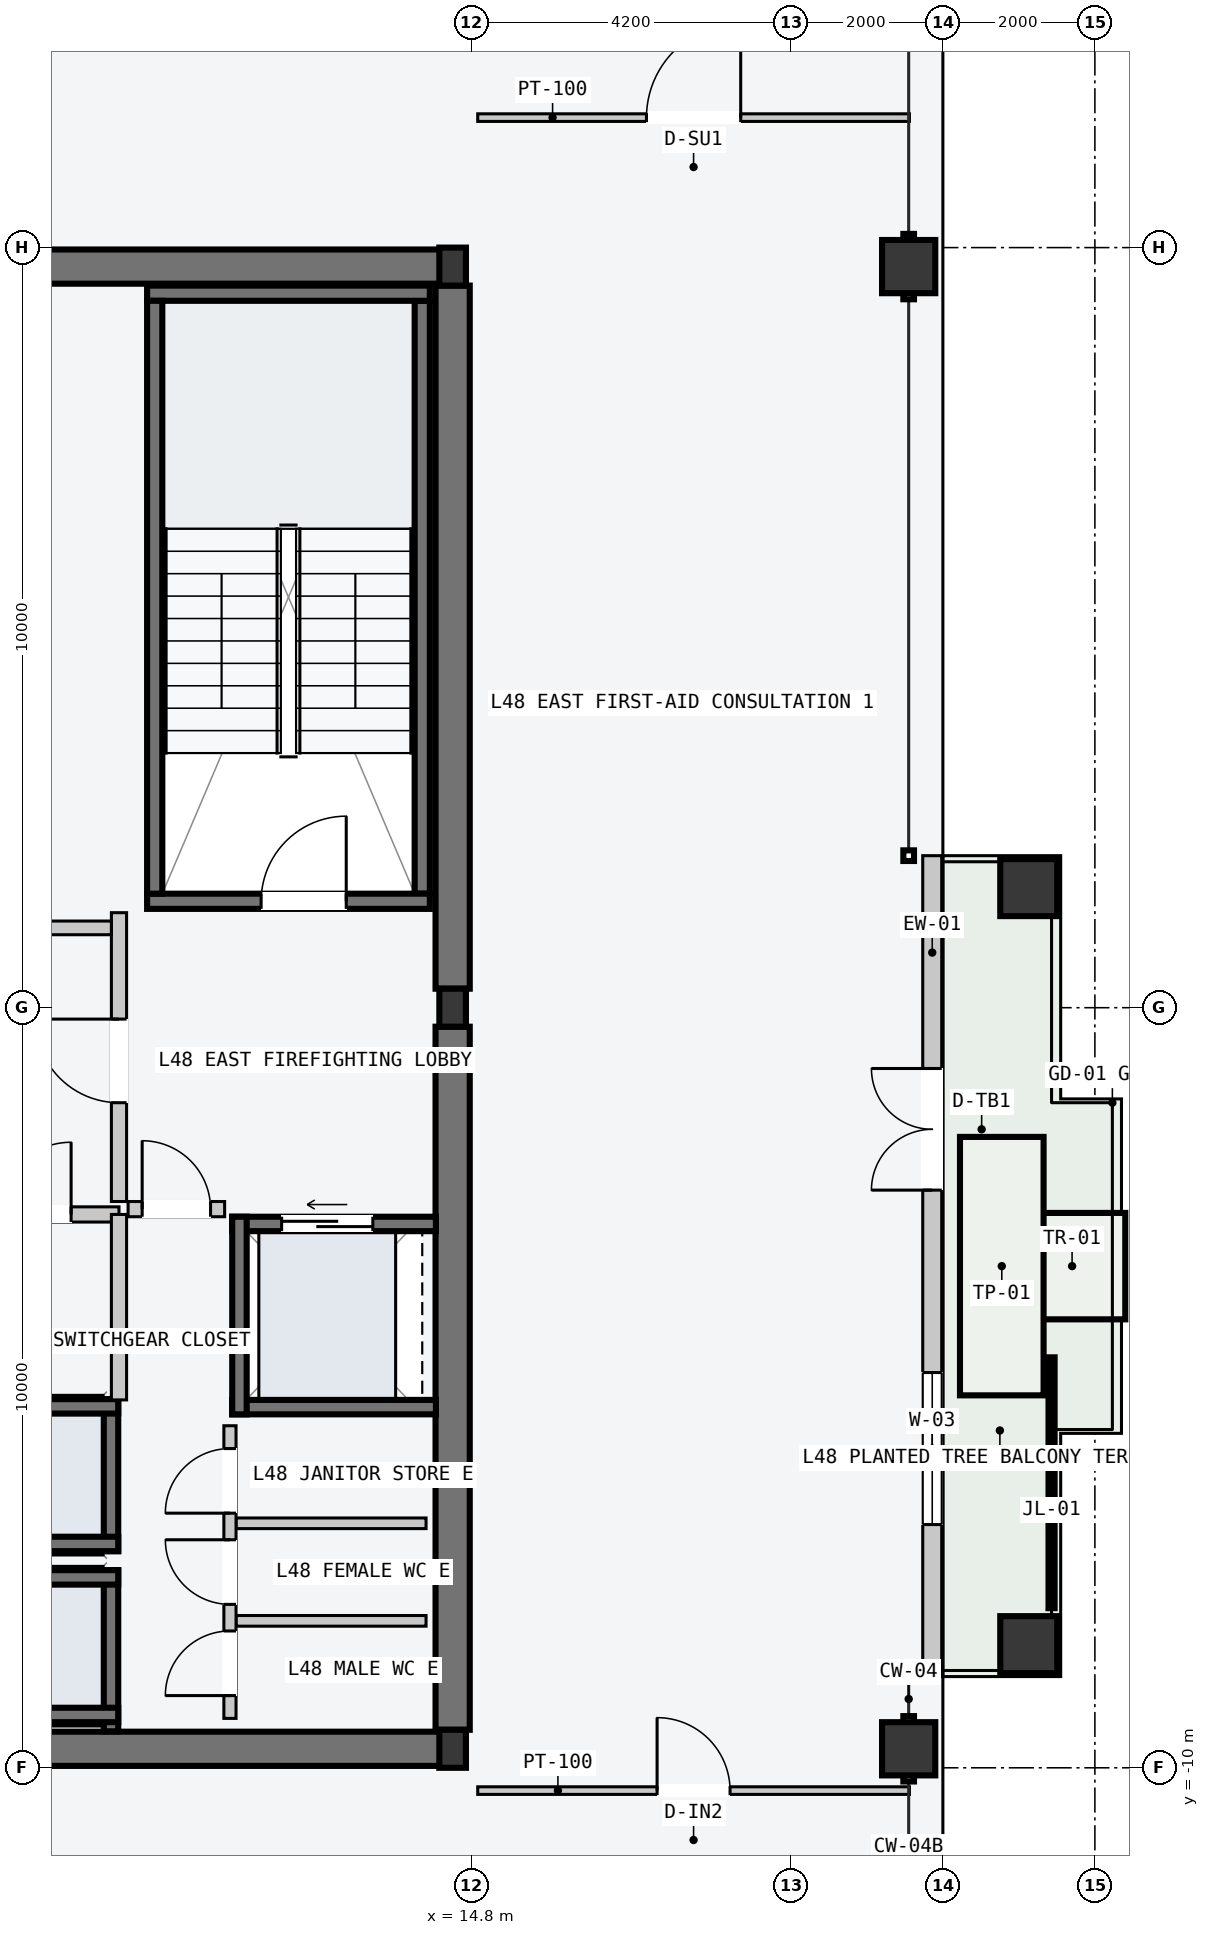
"""IFC4 building model, lengths in metres.
Left out: names, types, materials, properties, quantities, classifications, styles, units other than length and angle.
Written with IfcOpenShell. Run it as: python <this file> out.ifc"""

import sys

from ifc_helpers import new_model, si_unit, direction, frame, frame_2d, origin, origin_2d, place, context, subcontext, project, spatial, rectangle, hollow_rectangle, i_section, extrude, element, fill, save


model = new_model("IFC4")
c1 = context("Model", 3, precision=1e-05, world=origin(), true_north=direction((0.0, 1.0)))
c2 = subcontext(c1, "Body", "Model", "MODEL_VIEW")
j1 = project(units=[si_unit("LENGTHUNIT", "METRE"), si_unit("PLANEANGLEUNIT", "RADIAN")], contexts=[c1])
p1 = place(None, origin())
s1 = spatial("IfcSite", under=j1, at=p1, CompositionType="ELEMENT")
p2 = place(p1, origin())
s2 = spatial("IfcBuilding", under=s1, at=p2, CompositionType="ELEMENT")
p3 = place(p2, frame((0.0, 0.0, 183.9)))
s3 = spatial("IfcBuildingStorey", under=s2, at=p3, CompositionType="ELEMENT", Elevation=183.9)
for number, where, z_axis, x_axis in (
    (1, (8.07, -9.75, -0.2), (0.0, 0.0, 1.0), (1.0, 0.0, 0.0)),
    (2, (8.07, 9.75, -0.2), (0.0, 0.0, 1.0), (1.0, 0.0, 0.0)),
):
    element("IfcWall", number, at=place(p3, frame(where, z_axis=z_axis, x_axis=x_axis)), inside=s3, PredefinedType="SHEAR", context=c2, shape_type="SweptSolid", body=[
        extrude(rectangle(XDim=6.46, YDim=0.45, at=frame_2d((3.23, 0.0))), origin(), (0.0, 0.0, 1.0), 3.6),
    ])
for number, where, z_axis, x_axis in (
    (3, (14.55, -9.5, -0.2), (0.0, 0.0, 1.0), (0.0, 1.0, 0.0)),
    (4, (14.55, 0.25, -0.2), (0.0, 0.0, 1.0), (0.0, 1.0, 0.0)),
):
    element("IfcWall", number, at=place(p3, frame(where, z_axis=z_axis, x_axis=x_axis)), inside=s3, PredefinedType="SHEAR", context=c2, shape_type="SweptSolid", body=[
        extrude(rectangle(XDim=9.25, YDim=0.45, at=frame_2d((4.625, 0.0))), origin(), (0.0, 0.0, 1.0), 3.6),
    ])
p4 = place(p3, frame((14.15, 1.5, -0.2), z_axis=(0.0, 0.0, 1.0), x_axis=(0.0, 1.0, 0.0)))
e5 = element("IfcWall", 5, at=p4, inside=s3, PredefinedType="SOLIDWALL", context=c2, shape_type="SweptSolid", body=[
    extrude(rectangle(XDim=7.8, YDim=0.2, at=frame_2d((3.9, 0.0))), origin(), (0.0, 0.0, 1.0), 3.6),
])
p5 = place(p3, frame((10.53, 1.4, -0.2), z_axis=(0.0, 0.0, 1.0), x_axis=(1.0, 0.0, 0.0)))
e6 = element("IfcWall", 6, at=p5, inside=s3, PredefinedType="SOLIDWALL", context=c2, shape_type="SweptSolid", body=[
    extrude(rectangle(XDim=3.72, YDim=0.2, at=frame_2d((1.86, 0.0))), origin(), (0.0, 0.0, 1.0), 3.6),
])
p6 = place(p5, frame((1.5, 0.0, 0.2)))
e7 = element("IfcOpeningElement", 7, at=p6, cuts=e6, PredefinedType="OPENING", context=c2, shape_type="SweptSolid", body=[
    extrude(rectangle(XDim=1.12, YDim=2.18, at=frame_2d((0.56, 1.09))), frame((0.0, 0.11, 0.0), z_axis=(0.0, -1.0, 0.0), x_axis=(1.0, 0.0, 0.0)), (0.0, 0.0, 1.0), 0.22),
])
p7 = place(p3, frame((10.53, 9.4, -0.2), z_axis=(0.0, 0.0, 1.0), x_axis=(1.0, 0.0, 0.0)))
e8 = element("IfcWall", 8, at=p7, inside=s3, PredefinedType="SOLIDWALL", context=c2, shape_type="SweptSolid", body=[
    extrude(rectangle(XDim=3.72, YDim=0.2, at=frame_2d((1.86, 0.0))), origin(), (0.0, 0.0, 1.0), 3.6),
])
p8 = place(p3, frame((10.63, 1.5, -0.2), z_axis=(0.0, 0.0, 1.0), x_axis=(0.0, 1.0, 0.0)))
e9 = element("IfcWall", 9, at=p8, inside=s3, PredefinedType="SOLIDWALL", context=c2, shape_type="SweptSolid", body=[
    extrude(rectangle(XDim=7.8, YDim=0.2, at=frame_2d((3.9, 0.0))), origin(), (0.0, 0.0, 1.0), 3.6),
])
for number, where, z_axis, x_axis in (
    (10, (14.55, -9.75, 0.0), (0.0, 0.0, 1.0), (1.0, 0.0, 0.0)),
    (11, (14.55, 0.0, 0.0), (0.0, 0.0, 1.0), (1.0, 0.0, 0.0)),
    (12, (14.55, 9.75, 0.0), (0.0, 0.0, 1.0), (1.0, 0.0, 0.0)),
):
    element("IfcColumn", number, at=place(p3, frame(where, z_axis=z_axis, x_axis=x_axis)), inside=s3, PredefinedType="COLUMN", context=c2, shape_type="SweptSolid", body=[
        extrude(i_section(OverallWidth=0.35, OverallDepth=0.5, WebThickness=0.02, FlangeThickness=0.032, at=origin_2d()), origin(), (0.0, 0.0, 1.0), 3.6),
    ])
for number, where, z_axis, x_axis in (
    (13, (20.55, -9.75, 0.0), (0.0, 0.0, 1.0), (0.0, 1.0, 0.0)),
    (14, (20.55, 9.75, 0.0), (0.0, 0.0, 1.0), (0.0, 1.0, 0.0)),
):
    element("IfcColumn", number, at=place(p3, frame(where, z_axis=z_axis, x_axis=x_axis)), inside=s3, PredefinedType="COLUMN", context=c2, shape_type="SweptSolid", body=[
        extrude(hollow_rectangle(XDim=0.7, YDim=0.7, WallThickness=0.03, at=origin_2d()), origin(), (0.0, 0.0, 1.0), 3.6),
    ])
for number, where, z_axis, x_axis in (
    (15, (22.13, -8.38, -0.2), (0.0, 0.0, 1.0), (0.0, 1.0, 0.0)),
    (16, (22.13, 1.58, -0.2), (0.0, 0.0, 1.0), (0.0, 1.0, 0.0)),
):
    element("IfcColumn", number, at=place(p3, frame(where, z_axis=z_axis, x_axis=x_axis)), inside=s3, PredefinedType="COLUMN", context=c2, shape_type="SweptSolid", body=[
        extrude(hollow_rectangle(XDim=0.75, YDim=0.75, WallThickness=0.032, at=origin_2d()), origin(), (0.0, 0.0, 1.0), 3.8),
    ])
p9 = place(p3, frame((20.86, -8.8, 0.0), z_axis=(0.0, 0.0, 1.0), x_axis=(0.0, 1.0, 0.0)))
e17 = element("IfcWall", 17, at=p9, inside=s3, PredefinedType="STANDARD", context=c2, shape_type="SweptSolid", body=[
    extrude(rectangle(XDim=10.8, YDim=0.25, at=frame_2d((5.4, 0.0))), origin(), (0.0, 0.0, 1.0), 3.4),
])
p10 = place(p9, frame((6.4, 0.0, 0.0)))
e18 = element("IfcOpeningElement", 18, at=p10, cuts=e17, PredefinedType="OPENING", context=c2, shape_type="SweptSolid", body=[
    extrude(rectangle(XDim=1.6, YDim=2.2, at=frame_2d((0.8, 1.1))), frame((0.0, 0.135, 0.0), z_axis=(0.0, -1.0, 0.0), x_axis=(1.0, 0.0, 0.0)), (0.0, 0.0, 1.0), 0.27),
])
p11 = place(p9, frame((2.0, 0.0, 0.85)))
e19 = element("IfcOpeningElement", 19, at=p11, cuts=e17, PredefinedType="OPENING", context=c2, shape_type="SweptSolid", body=[
    extrude(rectangle(XDim=2.0, YDim=2.1, at=frame_2d((1.0, 1.05))), frame((0.0, 0.135, 0.0), z_axis=(0.0, -1.0, 0.0), x_axis=(1.0, 0.0, 0.0)), (0.0, 0.0, 1.0), 0.27),
])
p12 = place(p3, frame((10.055, -9.52, -0.2), z_axis=(0.0, 0.0, 1.0), x_axis=(0.0, 1.0, 0.0)))
e20 = element("IfcWall", 20, at=p12, inside=s3, PredefinedType="SOLIDWALL", context=c2, shape_type="SweptSolid", body=[
    extrude(rectangle(XDim=2.12, YDim=0.19, at=frame_2d((1.06, 0.0))), origin(), (0.0, 0.0, 1.0), 3.6),
])
for number, where, z_axis, x_axis in (
    (21, (7.95, -7.495, -0.2), (0.0, 0.0, 1.0), (1.0, 0.0, 0.0)),
    (22, (7.95, -9.305, -0.2), (0.0, 0.0, 1.0), (1.0, 0.0, 0.0)),
):
    element("IfcWall", number, at=place(p3, frame(where, z_axis=z_axis, x_axis=x_axis)), inside=s3, PredefinedType="SOLIDWALL", context=c2, shape_type="SweptSolid", body=[
        extrude(rectangle(XDim=2.2, YDim=0.19, at=frame_2d((1.1, 0.0))), origin(), (0.0, 0.0, 1.0), 3.6),
    ])
p13 = place(p3, frame((10.055, -7.15, -0.2), z_axis=(0.0, 0.0, 1.0), x_axis=(0.0, 1.0, 0.0)))
e23 = element("IfcWall", 23, at=p13, inside=s3, PredefinedType="SOLIDWALL", context=c2, shape_type="SweptSolid", body=[
    extrude(rectangle(XDim=2.0, YDim=0.19, at=frame_2d((1.0, 0.0))), origin(), (0.0, 0.0, 1.0), 3.6),
])
for number, where, z_axis, x_axis in (
    (24, (7.95, -5.245, -0.2), (0.0, 0.0, 1.0), (1.0, 0.0, 0.0)),
    (25, (7.95, -7.055, -0.2), (0.0, 0.0, 1.0), (1.0, 0.0, 0.0)),
):
    element("IfcWall", number, at=place(p3, frame(where, z_axis=z_axis, x_axis=x_axis)), inside=s3, PredefinedType="SOLIDWALL", context=c2, shape_type="SweptSolid", body=[
        extrude(rectangle(XDim=2.2, YDim=0.19, at=frame_2d((1.1, 0.0))), origin(), (0.0, 0.0, 1.0), 3.6),
    ])
p14 = place(p3, frame((11.65, -2.845, -0.2), z_axis=(0.0, 0.0, 1.0), x_axis=(1.0, 0.0, 0.0)))
e26 = element("IfcWall", 26, at=p14, inside=s3, PredefinedType="SOLIDWALL", context=c2, shape_type="SweptSolid", body=[
    extrude(rectangle(XDim=2.68, YDim=0.19, at=frame_2d((1.34, 0.0))), origin(), (0.0, 0.0, 1.0), 3.6),
])
p15 = place(p14, frame((0.65, 0.0, 0.2)))
e27 = element("IfcOpeningElement", 27, at=p15, cuts=e26, PredefinedType="OPENING", context=c2, shape_type="SweptSolid", body=[
    extrude(rectangle(XDim=1.2, YDim=2.2, at=frame_2d((0.6, 1.1))), frame((0.0, 0.105, 0.0), z_axis=(0.0, -1.0, 0.0), x_axis=(1.0, 0.0, 0.0)), (0.0, 0.0, 1.0), 0.21),
])
p16 = place(p3, frame((11.65, -5.255, -0.2), z_axis=(0.0, 0.0, 1.0), x_axis=(1.0, 0.0, 0.0)))
e28 = element("IfcWall", 28, at=p16, inside=s3, PredefinedType="SOLIDWALL", context=c2, shape_type="SweptSolid", body=[
    extrude(rectangle(XDim=2.68, YDim=0.19, at=frame_2d((1.34, 0.0))), origin(), (0.0, 0.0, 1.0), 3.6),
])
p17 = place(p3, frame((11.745, -5.35, -0.2), z_axis=(0.0, 0.0, 1.0), x_axis=(0.0, 1.0, 0.0)))
e29 = element("IfcWall", 29, at=p17, inside=s3, PredefinedType="SOLIDWALL", context=c2, shape_type="SweptSolid", body=[
    extrude(rectangle(XDim=2.6, YDim=0.19, at=frame_2d((1.3, 0.0))), origin(), (0.0, 0.0, 1.0), 3.6),
])
p18 = place(p3, frame((10.16, -2.55, 0.0), z_axis=(0.0, 0.0, 1.0), x_axis=(0.0, 1.0, 0.0)))
e30 = element("IfcWall", 30, at=p18, inside=s3, PredefinedType="PARTITIONING", context=c2, shape_type="SweptSolid", body=[
    extrude(rectangle(XDim=3.8, YDim=0.2, at=frame_2d((1.9, 0.0))), origin(), (0.0, 0.0, 1.0), 3.4),
])
p19 = place(p18, frame((1.3, 0.0, 0.0)))
e31 = element("IfcOpeningElement", 31, at=p19, cuts=e30, PredefinedType="OPENING", context=c2, shape_type="SweptSolid", body=[
    extrude(rectangle(XDim=1.1, YDim=2.15, at=frame_2d((0.55, 1.075))), frame((0.0, 0.11, 0.0), z_axis=(0.0, -1.0, 0.0), x_axis=(1.0, 0.0, 0.0)), (0.0, 0.0, 1.0), 0.22),
])
p20 = place(p3, frame((10.28, -2.65, 0.0), z_axis=(0.0, 0.0, 1.0), x_axis=(1.0, 0.0, 0.0)))
e32 = element("IfcWall", 32, at=p20, inside=s3, PredefinedType="PARTITIONING", context=c2, shape_type="SweptSolid", body=[
    extrude(rectangle(XDim=1.27, YDim=0.2, at=frame_2d((0.635, 0.0))), origin(), (0.0, 0.0, 1.0), 3.4),
])
p21 = place(p20, frame((0.185, 0.0, 0.0)))
e33 = element("IfcOpeningElement", 33, at=p21, cuts=e32, PredefinedType="OPENING", context=c2, shape_type="SweptSolid", body=[
    extrude(rectangle(XDim=0.9, YDim=2.15, at=frame_2d((0.45, 1.075))), frame((0.0, 0.11, 0.0), z_axis=(0.0, -1.0, 0.0), x_axis=(1.0, 0.0, 0.0)), (0.0, 0.0, 1.0), 0.22),
])
p22 = place(p3, frame((7.96, -2.72, 0.0), z_axis=(0.0, 0.0, 1.0), x_axis=(1.0, 0.0, 0.0)))
e34 = element("IfcWall", 34, at=p22, inside=s3, PredefinedType="PARTITIONING", context=c2, shape_type="SweptSolid", body=[
    extrude(rectangle(XDim=2.2, YDim=0.2, at=frame_2d((1.1, 0.0))), origin(), (0.0, 0.0, 1.0), 3.4),
])
p23 = place(p22, frame((0.62, 0.0, 0.0)))
e35 = element("IfcOpeningElement", 35, at=p23, cuts=e34, PredefinedType="OPENING", context=c2, shape_type="SweptSolid", body=[
    extrude(rectangle(XDim=0.95, YDim=2.1, at=frame_2d((0.475, 1.05))), frame((0.0, 0.11, 0.0), z_axis=(0.0, -1.0, 0.0), x_axis=(1.0, 0.0, 0.0)), (0.0, 0.0, 1.0), 0.22),
])
p24 = place(p3, frame((10.16, -5.16, 0.0), z_axis=(0.0, 0.0, 1.0), x_axis=(0.0, 1.0, 0.0)))
e36 = element("IfcWall", 36, at=p24, inside=s3, PredefinedType="PARTITIONING", context=c2, shape_type="SweptSolid", body=[
    extrude(rectangle(XDim=2.44, YDim=0.2, at=frame_2d((1.22, 0.0))), origin(), (0.0, 0.0, 1.0), 3.4),
])
for number, where, z_axis, x_axis in (
    (37, (11.7, -8.067, 0.0), (0.0, 0.0, 1.0), (1.0, 0.0, 0.0)),
    (38, (11.7, -6.783, 0.0), (0.0, 0.0, 1.0), (1.0, 0.0, 0.0)),
):
    element("IfcWall", number, at=place(p3, frame(where, z_axis=z_axis, x_axis=x_axis)), inside=s3, PredefinedType="PARTITIONING", context=c2, shape_type="SweptSolid", body=[
        extrude(rectangle(XDim=2.5, YDim=0.14, at=frame_2d((1.25, 0.0))), origin(), (0.0, 0.0, 1.0), 3.4),
    ])
p25 = place(p3, frame((11.62, -9.35, 0.0), z_axis=(0.0, 0.0, 1.0), x_axis=(0.0, 1.0, 0.0)))
e39 = element("IfcWall", 39, at=p25, inside=s3, PredefinedType="PARTITIONING", context=c2, shape_type="SweptSolid", body=[
    extrude(rectangle(XDim=3.85, YDim=0.16, at=frame_2d((1.925, 0.0))), origin(), (0.0, 0.0, 1.0), 3.4),
])
p26 = place(p25, frame((0.3, 0.0, 0.0)))
e40 = element("IfcOpeningElement", 40, at=p26, cuts=e39, PredefinedType="OPENING", context=c2, shape_type="SweptSolid", body=[
    extrude(rectangle(XDim=0.85, YDim=2.12, at=frame_2d((0.425, 1.06))), frame((0.0, 0.09, 0.0), z_axis=(0.0, -1.0, 0.0), x_axis=(1.0, 0.0, 0.0)), (0.0, 0.0, 1.0), 0.18),
])
p27 = place(p25, frame((1.5, 0.0, 0.0)))
e41 = element("IfcOpeningElement", 41, at=p27, cuts=e39, PredefinedType="OPENING", context=c2, shape_type="SweptSolid", body=[
    extrude(rectangle(XDim=0.85, YDim=2.12, at=frame_2d((0.425, 1.06))), frame((0.0, 0.09, 0.0), z_axis=(0.0, -1.0, 0.0), x_axis=(1.0, 0.0, 0.0)), (0.0, 0.0, 1.0), 0.18),
])
p28 = place(p25, frame((2.7, 0.0, 0.0)))
e42 = element("IfcOpeningElement", 42, at=p28, cuts=e39, PredefinedType="OPENING", context=c2, shape_type="SweptSolid", body=[
    extrude(rectangle(XDim=0.85, YDim=2.12, at=frame_2d((0.425, 1.06))), frame((0.0, 0.09, 0.0), z_axis=(0.0, -1.0, 0.0), x_axis=(1.0, 0.0, 0.0)), (0.0, 0.0, 1.0), 0.18),
])
p29 = place(p3, frame((1.26, 1.05, 0.0), z_axis=(0.0, 0.0, 1.0), x_axis=(1.0, 0.0, 0.0)))
e43 = element("IfcWall", 43, at=p29, inside=s3, PredefinedType="PARTITIONING", context=c2, shape_type="SweptSolid", body=[
    extrude(rectangle(XDim=8.8, YDim=0.18, at=frame_2d((4.4, 0.0))), origin(), (0.0, 0.0, 1.0), 3.4),
])
p30 = place(p3, frame((14.88, 11.71, 0.0), z_axis=(0.0, 0.0, 1.0), x_axis=(1.0, 0.0, 0.0)))
e44 = element("IfcWall", 44, at=p30, inside=s3, PredefinedType="PARTITIONING", context=c2, shape_type="SweptSolid", body=[
    extrude(rectangle(XDim=5.68, YDim=0.1, at=frame_2d((2.84, 0.0))), origin(), (0.0, 0.0, 1.0), 3.4),
])
p31 = place(p30, frame((2.22, 0.0, 0.0)))
e45 = element("IfcOpeningElement", 45, at=p31, cuts=e44, PredefinedType="OPENING", context=c2, shape_type="SweptSolid", body=[
    extrude(rectangle(XDim=1.24, YDim=2.24, at=frame_2d((0.62, 1.12))), frame((0.0, 0.06, 0.0), z_axis=(0.0, -1.0, 0.0), x_axis=(1.0, 0.0, 0.0)), (0.0, 0.0, 1.0), 0.12),
])
p32 = place(p3, frame((14.88, -10.3, 0.0), z_axis=(0.0, 0.0, 1.0), x_axis=(1.0, 0.0, 0.0)))
e46 = element("IfcWall", 46, at=p32, inside=s3, PredefinedType="PARTITIONING", context=c2, shape_type="SweptSolid", body=[
    extrude(rectangle(XDim=5.68, YDim=0.1, at=frame_2d((2.84, 0.0))), origin(), (0.0, 0.0, 1.0), 3.4),
])
p33 = place(p32, frame((2.36, 0.0, 0.0)))
e47 = element("IfcOpeningElement", 47, at=p33, cuts=e46, PredefinedType="OPENING", context=c2, shape_type="SweptSolid", body=[
    extrude(rectangle(XDim=0.96, YDim=2.18, at=frame_2d((0.48, 1.09))), frame((0.0, 0.06, 0.0), z_axis=(0.0, -1.0, 0.0), x_axis=(1.0, 0.0, 0.0)), (0.0, 0.0, 1.0), 0.12),
])
p34 = place(p6, origin())
e48 = element("IfcDoor", 48, at=p34, inside=s3, OperationType="SINGLE_SWING_RIGHT", PredefinedType="DOOR", context=c2, shape_type="SweptSolid", body=[
    extrude(rectangle(XDim=1.12, YDim=2.18, at=frame_2d((0.56, 1.09))), frame((0.0, 0.025, 0.0), z_axis=(0.0, -1.0, 0.0), x_axis=(1.0, 0.0, 0.0)), (0.0, 0.0, 1.0), 0.05),
])
fill(e7, e48)
p35 = place(p10, origin())
e49 = element("IfcDoor", 49, at=p35, inside=s3, OperationType="DOUBLE_DOOR_SINGLE_SWING", PredefinedType="DOOR", context=c2, shape_type="SweptSolid", body=[
    extrude(rectangle(XDim=1.6, YDim=2.2, at=frame_2d((0.8, 1.1))), frame((0.0, 0.025, 0.0), z_axis=(0.0, -1.0, 0.0), x_axis=(1.0, 0.0, 0.0)), (0.0, 0.0, 1.0), 0.05),
])
fill(e18, e49)
p36 = place(p11, origin())
e50 = element("IfcWindow", 50, at=p36, inside=s3, PartitioningType="SINGLE_PANEL", PredefinedType="WINDOW", context=c2, shape_type="SweptSolid", body=[
    extrude(rectangle(XDim=2.0, YDim=2.1, at=frame_2d((1.0, 1.05))), frame((0.0, 0.03, 0.0), z_axis=(0.0, -1.0, 0.0), x_axis=(1.0, 0.0, 0.0)), (0.0, 0.0, 1.0), 0.06),
])
fill(e19, e50)
p37 = place(p15, origin())
e51 = element("IfcDoor", 51, at=p37, inside=s3, OperationType="SLIDING_TO_LEFT", PredefinedType="DOOR", context=c2, shape_type="SweptSolid", body=[
    extrude(rectangle(XDim=1.2, YDim=2.2, at=frame_2d((0.6, 1.1))), frame((0.0, 0.025, 0.0), z_axis=(0.0, -1.0, 0.0), x_axis=(1.0, 0.0, 0.0)), (0.0, 0.0, 1.0), 0.05),
])
fill(e27, e51)
p38 = place(p19, origin())
e52 = element("IfcDoor", 52, at=p38, inside=s3, OperationType="SINGLE_SWING_RIGHT", PredefinedType="DOOR", context=c2, shape_type="SweptSolid", body=[
    extrude(rectangle(XDim=1.1, YDim=2.15, at=frame_2d((0.55, 1.075))), frame((0.0, 0.025, 0.0), z_axis=(0.0, -1.0, 0.0), x_axis=(1.0, 0.0, 0.0)), (0.0, 0.0, 1.0), 0.05),
])
fill(e31, e52)
p39 = place(p21, origin())
e53 = element("IfcDoor", 53, at=p39, inside=s3, OperationType="SINGLE_SWING_LEFT", PredefinedType="DOOR", context=c2, shape_type="SweptSolid", body=[
    extrude(rectangle(XDim=0.9, YDim=2.15, at=frame_2d((0.45, 1.075))), frame((0.0, 0.025, 0.0), z_axis=(0.0, -1.0, 0.0), x_axis=(1.0, 0.0, 0.0)), (0.0, 0.0, 1.0), 0.05),
])
fill(e33, e53)
p40 = place(p23, origin())
e54 = element("IfcDoor", 54, at=p40, inside=s3, OperationType="SINGLE_SWING_RIGHT", PredefinedType="DOOR", context=c2, shape_type="SweptSolid", body=[
    extrude(rectangle(XDim=0.95, YDim=2.1, at=frame_2d((0.475, 1.05))), frame((0.0, 0.025, 0.0), z_axis=(0.0, -1.0, 0.0), x_axis=(1.0, 0.0, 0.0)), (0.0, 0.0, 1.0), 0.05),
])
fill(e35, e54)
p41 = place(p26, origin())
e55 = element("IfcDoor", 55, at=p41, inside=s3, OperationType="SINGLE_SWING_LEFT", PredefinedType="DOOR", context=c2, shape_type="SweptSolid", body=[
    extrude(rectangle(XDim=0.85, YDim=2.12, at=frame_2d((0.425, 1.06))), frame((0.0, 0.025, 0.0), z_axis=(0.0, -1.0, 0.0), x_axis=(1.0, 0.0, 0.0)), (0.0, 0.0, 1.0), 0.05),
])
fill(e40, e55)
p42 = place(p27, origin())
e56 = element("IfcDoor", 56, at=p42, inside=s3, OperationType="SINGLE_SWING_RIGHT", PredefinedType="DOOR", context=c2, shape_type="SweptSolid", body=[
    extrude(rectangle(XDim=0.85, YDim=2.12, at=frame_2d((0.425, 1.06))), frame((0.0, 0.025, 0.0), z_axis=(0.0, -1.0, 0.0), x_axis=(1.0, 0.0, 0.0)), (0.0, 0.0, 1.0), 0.05),
])
fill(e41, e56)
p43 = place(p28, origin())
e57 = element("IfcDoor", 57, at=p43, inside=s3, OperationType="SINGLE_SWING_LEFT", PredefinedType="DOOR", context=c2, shape_type="SweptSolid", body=[
    extrude(rectangle(XDim=0.85, YDim=2.12, at=frame_2d((0.425, 1.06))), frame((0.0, 0.025, 0.0), z_axis=(0.0, -1.0, 0.0), x_axis=(1.0, 0.0, 0.0)), (0.0, 0.0, 1.0), 0.05),
])
fill(e42, e57)
p44 = place(p31, origin())
e58 = element("IfcDoor", 58, at=p44, inside=s3, OperationType="SINGLE_SWING_RIGHT", PredefinedType="DOOR", context=c2, shape_type="SweptSolid", body=[
    extrude(rectangle(XDim=1.24, YDim=2.24, at=frame_2d((0.62, 1.12))), frame((0.0, 0.025, 0.0), z_axis=(0.0, -1.0, 0.0), x_axis=(1.0, 0.0, 0.0)), (0.0, 0.0, 1.0), 0.05),
])
fill(e45, e58)
p45 = place(p33, origin())
e59 = element("IfcDoor", 59, at=p45, inside=s3, OperationType="SINGLE_SWING_LEFT", PredefinedType="DOOR", context=c2, shape_type="SweptSolid", body=[
    extrude(rectangle(XDim=0.96, YDim=2.18, at=frame_2d((0.48, 1.09))), frame((0.0, 0.025, 0.0), z_axis=(0.0, -1.0, 0.0), x_axis=(1.0, 0.0, 0.0)), (0.0, 0.0, 1.0), 0.05),
])
fill(e47, e59)
save(model, sys.argv[1])
